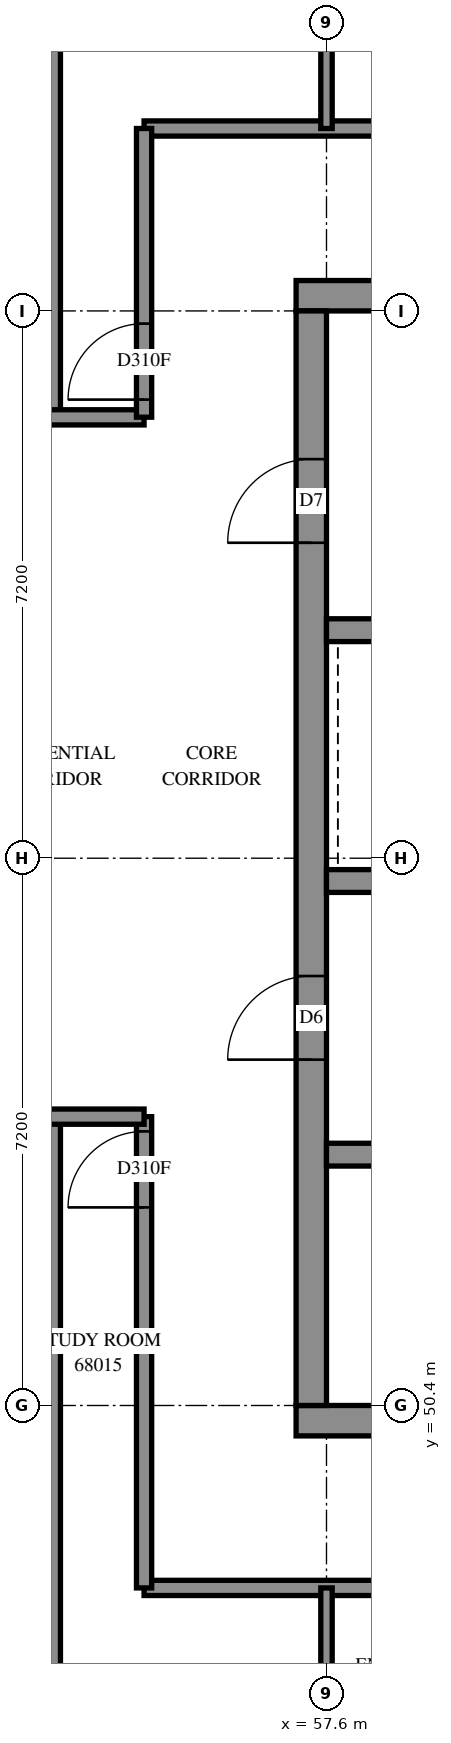
"""IFC4 building model, lengths in metres.
Left out: names, types, materials, properties, quantities, classifications, styles, units other than length and angle.
Written with IfcOpenShell. Run it as: python <this file> out.ifc"""

import sys

from ifc_helpers import new_model, si_unit, direction, frame, frame_2d, origin, place, context, subcontext, project, spatial, rectangle, extrude, element, fill, save


model = new_model("IFC4")
c1 = context("Model", 3, precision=1e-05, world=origin(), true_north=direction((0.0, 1.0)))
c2 = subcontext(c1, "Body", "Model", "MODEL_VIEW")
j1 = project(units=[si_unit("LENGTHUNIT", "METRE"), si_unit("PLANEANGLEUNIT", "RADIAN")], contexts=[c1])
p1 = place(None, origin())
s1 = spatial("IfcSite", under=j1, at=p1, CompositionType="ELEMENT")
p2 = place(p1, origin())
s2 = spatial("IfcBuilding", under=s1, at=p2, CompositionType="ELEMENT")
p3 = place(p2, frame((0.0, 0.0, 250.6)))
s3 = spatial("IfcBuildingStorey", under=s2, at=p3, CompositionType="ELEMENT", Elevation=250.6)
p4 = place(p3, frame((57.2, 50.2, -0.3), z_axis=(0.0, 0.0, 1.0), x_axis=(1.0, 0.0, 0.0)))
e1 = element("IfcWall", 1, at=p4, inside=s3, PredefinedType="SHEAR", context=c2, shape_type="SweptSolid", body=[
    extrude(rectangle(XDim=15.2, YDim=0.4, at=frame_2d((7.6, 0.0))), origin(), (0.0, 0.0, 1.0), 2.7),
])
p5 = place(p3, frame((57.2, 65.0, -0.3), z_axis=(0.0, 0.0, 1.0), x_axis=(1.0, 0.0, 0.0)))
e2 = element("IfcWall", 2, at=p5, inside=s3, PredefinedType="SHEAR", context=c2, shape_type="SweptSolid", body=[
    extrude(rectangle(XDim=15.2, YDim=0.4, at=frame_2d((7.6, 0.0))), origin(), (0.0, 0.0, 1.0), 2.7),
])
p6 = place(p5, frame((10.4, 0.0, 0.3)))
e3 = element("IfcOpeningElement", 3, at=p6, cuts=e2, PredefinedType="OPENING", context=c2, shape_type="SweptSolid", body=[
    extrude(rectangle(XDim=0.8, YDim=2.1, at=frame_2d((0.4, 1.05))), frame((0.0, 0.21, 0.0), z_axis=(0.0, -1.0, 0.0), x_axis=(1.0, 0.0, 0.0)), (0.0, 0.0, 1.0), 0.42),
])
p7 = place(p3, frame((57.4, 50.4, -0.3), z_axis=(0.0, 0.0, 1.0), x_axis=(0.0, 1.0, 0.0)))
e4 = element("IfcWall", 4, at=p7, inside=s3, PredefinedType="SHEAR", context=c2, shape_type="SweptSolid", body=[
    extrude(rectangle(XDim=14.4, YDim=0.4, at=frame_2d((7.2, 0.0))), origin(), (0.0, 0.0, 1.0), 2.7),
])
p8 = place(p7, frame((4.55, 0.0, 0.3)))
e5 = element("IfcOpeningElement", 5, at=p8, cuts=e4, PredefinedType="OPENING", context=c2, shape_type="SweptSolid", body=[
    extrude(rectangle(XDim=1.1, YDim=2.1, at=frame_2d((0.55, 1.05))), frame((0.0, 0.21, 0.0), z_axis=(0.0, -1.0, 0.0), x_axis=(1.0, 0.0, 0.0)), (0.0, 0.0, 1.0), 0.42),
])
p9 = place(p7, frame((11.35, 0.0, 0.3)))
e6 = element("IfcOpeningElement", 6, at=p9, cuts=e4, PredefinedType="OPENING", context=c2, shape_type="SweptSolid", body=[
    extrude(rectangle(XDim=1.1, YDim=2.1, at=frame_2d((0.55, 1.05))), frame((0.0, 0.21, 0.0), z_axis=(0.0, -1.0, 0.0), x_axis=(1.0, 0.0, 0.0)), (0.0, 0.0, 1.0), 0.42),
])
p10 = place(p3, frame((57.6, 53.7, 0.0), z_axis=(0.0, 0.0, 1.0), x_axis=(1.0, 0.0, 0.0)))
e7 = element("IfcWall", 7, at=p10, inside=s3, PredefinedType="SOLIDWALL", context=c2, shape_type="SweptSolid", body=[
    extrude(rectangle(XDim=14.4, YDim=0.3, at=frame_2d((7.2, 0.0))), origin(), (0.0, 0.0, 1.0), 3.1),
])
p11 = place(p10, frame((1.35, 0.0, 0.0)))
e8 = element("IfcOpeningElement", 8, at=p11, cuts=e7, PredefinedType="OPENING", context=c2, shape_type="SweptSolid", body=[
    extrude(rectangle(XDim=0.9, YDim=2.1, at=frame_2d((0.45, 1.05))), frame((0.0, 0.16, 0.0), z_axis=(0.0, -1.0, 0.0), x_axis=(1.0, 0.0, 0.0)), (0.0, 0.0, 1.0), 0.32),
])
p12 = place(p10, frame((4.95, 0.0, 0.0)))
e9 = element("IfcOpeningElement", 9, at=p12, cuts=e7, PredefinedType="OPENING", context=c2, shape_type="SweptSolid", body=[
    extrude(rectangle(XDim=0.9, YDim=2.1, at=frame_2d((0.45, 1.05))), frame((0.0, 0.16, 0.0), z_axis=(0.0, -1.0, 0.0), x_axis=(1.0, 0.0, 0.0)), (0.0, 0.0, 1.0), 0.32),
])
p13 = place(p10, frame((8.55, 0.0, 0.0)))
e10 = element("IfcOpeningElement", 10, at=p13, cuts=e7, PredefinedType="OPENING", context=c2, shape_type="SweptSolid", body=[
    extrude(rectangle(XDim=0.9, YDim=2.1, at=frame_2d((0.45, 1.05))), frame((0.0, 0.16, 0.0), z_axis=(0.0, -1.0, 0.0), x_axis=(1.0, 0.0, 0.0)), (0.0, 0.0, 1.0), 0.32),
])
p14 = place(p10, frame((12.05, 0.0, 0.0)))
e11 = element("IfcOpeningElement", 11, at=p14, cuts=e7, PredefinedType="OPENING", context=c2, shape_type="SweptSolid", body=[
    extrude(rectangle(XDim=1.1, YDim=2.1, at=frame_2d((0.55, 1.05))), frame((0.0, 0.16, 0.0), z_axis=(0.0, -1.0, 0.0), x_axis=(1.0, 0.0, 0.0)), (0.0, 0.0, 1.0), 0.32),
])
p15 = place(p3, frame((57.6, 57.3, 0.0), z_axis=(0.0, 0.0, 1.0), x_axis=(1.0, 0.0, 0.0)))
e12 = element("IfcWall", 12, at=p15, inside=s3, PredefinedType="SOLIDWALL", context=c2, shape_type="SweptSolid", body=[
    extrude(rectangle(XDim=14.4, YDim=0.3, at=frame_2d((7.2, 0.0))), origin(), (0.0, 0.0, 1.0), 3.1),
])
p16 = place(p15, frame((8.55, 0.0, 0.0)))
e13 = element("IfcOpeningElement", 13, at=p16, cuts=e12, PredefinedType="OPENING", context=c2, shape_type="SweptSolid", body=[
    extrude(rectangle(XDim=0.9, YDim=2.1, at=frame_2d((0.45, 1.05))), frame((0.0, 0.16, 0.0), z_axis=(0.0, -1.0, 0.0), x_axis=(1.0, 0.0, 0.0)), (0.0, 0.0, 1.0), 0.32),
])
p17 = place(p15, frame((1.25, 0.0, 0.0)))
e14 = element("IfcOpeningElement", 14, at=p17, cuts=e12, PredefinedType="OPENING", context=c2, shape_type="SweptSolid", body=[
    extrude(rectangle(XDim=1.1, YDim=2.1, at=frame_2d((0.55, 1.05))), frame((0.0, 0.16, 0.0), z_axis=(0.0, -1.0, 0.0), x_axis=(1.0, 0.0, 0.0)), (0.0, 0.0, 1.0), 0.32),
])
p18 = place(p15, frame((4.85, 0.0, 0.0)))
e15 = element("IfcOpeningElement", 15, at=p18, cuts=e12, PredefinedType="OPENING", context=c2, shape_type="SweptSolid", body=[
    extrude(rectangle(XDim=1.1, YDim=2.1, at=frame_2d((0.55, 1.05))), frame((0.0, 0.16, 0.0), z_axis=(0.0, -1.0, 0.0), x_axis=(1.0, 0.0, 0.0)), (0.0, 0.0, 1.0), 0.32),
])
p19 = place(p15, frame((12.05, 0.0, 0.0)))
e16 = element("IfcOpeningElement", 16, at=p19, cuts=e12, PredefinedType="OPENING", context=c2, shape_type="SweptSolid", body=[
    extrude(rectangle(XDim=1.1, YDim=2.1, at=frame_2d((0.55, 1.05))), frame((0.0, 0.16, 0.0), z_axis=(0.0, -1.0, 0.0), x_axis=(1.0, 0.0, 0.0)), (0.0, 0.0, 1.0), 0.32),
])
p20 = place(p3, frame((57.6, 60.6, 0.0), z_axis=(0.0, 0.0, 1.0), x_axis=(1.0, 0.0, 0.0)))
e17 = element("IfcWall", 17, at=p20, inside=s3, PredefinedType="SOLIDWALL", context=c2, shape_type="SweptSolid", body=[
    extrude(rectangle(XDim=7.2, YDim=0.3, at=frame_2d((3.6, 0.0))), origin(), (0.0, 0.0, 1.0), 3.1),
])
p21 = place(p3, frame((55.2, 67.2, 0.0), z_axis=(0.0, 0.0, 1.0), x_axis=(1.0, 0.0, 0.0)))
e18 = element("IfcWall", 18, at=p21, inside=s3, PredefinedType="PARTITIONING", context=c2, shape_type="SweptSolid", body=[
    extrude(rectangle(XDim=19.2, YDim=0.2, at=frame_2d((9.6, 0.0))), origin(), (0.0, 0.0, 1.0), 3.1),
])
p22 = place(p21, frame((6.299, 0.0, 0.0)))
e19 = element("IfcOpeningElement", 19, at=p22, cuts=e18, PredefinedType="OPENING", context=c2, shape_type="SweptSolid", body=[
    extrude(rectangle(XDim=0.9, YDim=2.1, at=frame_2d((0.45, 1.05))), frame((0.0, 0.11, 0.0), z_axis=(0.0, -1.0, 0.0), x_axis=(1.0, 0.0, 0.0)), (0.0, 0.0, 1.0), 0.22),
])
p23 = place(p21, frame((13.65, 0.0, 0.0)))
e20 = element("IfcOpeningElement", 20, at=p23, cuts=e18, PredefinedType="OPENING", context=c2, shape_type="SweptSolid", body=[
    extrude(rectangle(XDim=0.9, YDim=2.1, at=frame_2d((0.45, 1.05))), frame((0.0, 0.11, 0.0), z_axis=(0.0, -1.0, 0.0), x_axis=(1.0, 0.0, 0.0)), (0.0, 0.0, 1.0), 0.22),
])
p24 = place(p3, frame((55.2, 48.0, 0.0), z_axis=(0.0, 0.0, 1.0), x_axis=(1.0, 0.0, 0.0)))
e21 = element("IfcWall", 21, at=p24, inside=s3, PredefinedType="PARTITIONING", context=c2, shape_type="SweptSolid", body=[
    extrude(rectangle(XDim=19.15, YDim=0.2, at=frame_2d((9.575, 0.0))), origin(), (0.0, 0.0, 1.0), 3.1),
])
p25 = place(p24, frame((6.299, 0.0, 0.0)))
e22 = element("IfcOpeningElement", 22, at=p25, cuts=e21, PredefinedType="OPENING", context=c2, shape_type="SweptSolid", body=[
    extrude(rectangle(XDim=0.9, YDim=2.1, at=frame_2d((0.45, 1.05))), frame((0.0, 0.11, 0.0), z_axis=(0.0, -1.0, 0.0), x_axis=(1.0, 0.0, 0.0)), (0.0, 0.0, 1.0), 0.22),
])
p26 = place(p24, frame((13.499, 0.0, 0.0)))
e23 = element("IfcOpeningElement", 23, at=p26, cuts=e21, PredefinedType="OPENING", context=c2, shape_type="SweptSolid", body=[
    extrude(rectangle(XDim=0.9, YDim=2.1, at=frame_2d((0.45, 1.05))), frame((0.0, 0.11, 0.0), z_axis=(0.0, -1.0, 0.0), x_axis=(1.0, 0.0, 0.0)), (0.0, 0.0, 1.0), 0.22),
])
p27 = place(p3, frame((54.0, 42.331, 0.0), z_axis=(0.0, 0.0, 1.0), x_axis=(0.0, 1.0, 0.0)))
e24 = element("IfcWall", 24, at=p27, inside=s3, PredefinedType="PARTITIONING", context=c2, shape_type="SweptSolid", body=[
    extrude(rectangle(XDim=11.87, YDim=0.2, at=frame_2d((5.935, 0.0))), origin(), (0.0, 0.0, 1.0), 3.1),
])
p28 = place(p3, frame((54.0, 63.4, 0.0), z_axis=(0.0, 0.0, 1.0), x_axis=(0.0, 1.0, 0.0)))
e25 = element("IfcWall", 25, at=p28, inside=s3, PredefinedType="PARTITIONING", context=c2, shape_type="SweptSolid", body=[
    extrude(rectangle(XDim=9.408, YDim=0.2, at=frame_2d((4.704, 0.0))), origin(), (0.0, 0.0, 1.0), 3.1),
])
p29 = place(p3, frame((55.2, 48.0, 0.0), z_axis=(0.0, 0.0, 1.0), x_axis=(0.0, 1.0, 0.0)))
e26 = element("IfcWall", 26, at=p29, inside=s3, PredefinedType="PARTITIONING", context=c2, shape_type="SweptSolid", body=[
    extrude(rectangle(XDim=6.2, YDim=0.2, at=frame_2d((3.1, 0.0))), origin(), (0.0, 0.0, 1.0), 3.1),
])
p30 = place(p29, frame((5.006, 0.0, 0.0)))
e27 = element("IfcOpeningElement", 27, at=p30, cuts=e26, PredefinedType="OPENING", context=c2, shape_type="SweptSolid", body=[
    extrude(rectangle(XDim=1.0, YDim=2.1, at=frame_2d((0.5, 1.05))), frame((0.0, 0.11, 0.0), z_axis=(0.0, -1.0, 0.0), x_axis=(1.0, 0.0, 0.0)), (0.0, 0.0, 1.0), 0.22),
])
p31 = place(p3, frame((50.85, 54.2, 0.0), z_axis=(0.0, 0.0, 1.0), x_axis=(1.0, 0.0, 0.0)))
e28 = element("IfcWall", 28, at=p31, inside=s3, PredefinedType="PARTITIONING", context=c2, shape_type="SweptSolid", body=[
    extrude(rectangle(XDim=4.35, YDim=0.2, at=frame_2d((2.175, 0.0))), origin(), (0.0, 0.0, 1.0), 3.1),
])
p32 = place(p31, frame((1.931, 0.0, 0.0)))
e29 = element("IfcOpeningElement", 29, at=p32, cuts=e28, PredefinedType="OPENING", context=c2, shape_type="SweptSolid", body=[
    extrude(rectangle(XDim=1.0, YDim=2.1, at=frame_2d((0.5, 1.05))), frame((0.0, 0.11, 0.0), z_axis=(0.0, -1.0, 0.0), x_axis=(1.0, 0.0, 0.0)), (0.0, 0.0, 1.0), 0.22),
])
p33 = place(p3, frame((50.85, 63.4, 0.0), z_axis=(0.0, 0.0, 1.0), x_axis=(1.0, 0.0, 0.0)))
e30 = element("IfcWall", 30, at=p33, inside=s3, PredefinedType="PARTITIONING", context=c2, shape_type="SweptSolid", body=[
    extrude(rectangle(XDim=4.35, YDim=0.2, at=frame_2d((2.175, 0.0))), origin(), (0.0, 0.0, 1.0), 3.1),
])
p34 = place(p33, frame((1.946, 0.0, 0.0)))
e31 = element("IfcOpeningElement", 31, at=p34, cuts=e30, PredefinedType="OPENING", context=c2, shape_type="SweptSolid", body=[
    extrude(rectangle(XDim=1.0, YDim=2.1, at=frame_2d((0.5, 1.05))), frame((0.0, 0.11, 0.0), z_axis=(0.0, -1.0, 0.0), x_axis=(1.0, 0.0, 0.0)), (0.0, 0.0, 1.0), 0.22),
])
p35 = place(p3, frame((55.2, 63.402, 0.0), z_axis=(0.0, 0.0, 1.0), x_axis=(0.0, 1.0, 0.0)))
e32 = element("IfcWall", 32, at=p35, inside=s3, PredefinedType="PARTITIONING", context=c2, shape_type="SweptSolid", body=[
    extrude(rectangle(XDim=3.798, YDim=0.2, at=frame_2d((1.899, 0.0))), origin(), (0.0, 0.0, 1.0), 3.1),
])
p36 = place(p35, frame((0.231, 0.0, 0.0)))
e33 = element("IfcOpeningElement", 33, at=p36, cuts=e32, PredefinedType="OPENING", context=c2, shape_type="SweptSolid", body=[
    extrude(rectangle(XDim=1.0, YDim=2.1, at=frame_2d((0.5, 1.05))), frame((0.0, 0.11, 0.0), z_axis=(0.0, -1.0, 0.0), x_axis=(1.0, 0.0, 0.0)), (0.0, 0.0, 1.0), 0.22),
])
for number, where, z_axis, x_axis in (
    (34, (57.6, 45.6, 0.0), (0.0, 0.0, 1.0), (0.0, 1.0, 0.0)),
    (35, (57.6, 67.2, 0.0), (0.0, 0.0, 1.0), (0.0, 1.0, 0.0)),
):
    element("IfcWall", number, at=place(p3, frame(where, z_axis=z_axis, x_axis=x_axis)), inside=s3, PredefinedType="PARTITIONING", context=c2, shape_type="SweptSolid", body=[
        extrude(rectangle(XDim=2.4, YDim=0.15, at=frame_2d((1.2, 0.0))), origin(), (0.0, 0.0, 1.0), 3.1),
    ])
p37 = place(p8, origin())
e36 = element("IfcDoor", 36, at=p37, inside=s3, OperationType="DOUBLE_DOOR_SINGLE_SWING", PredefinedType="DOOR", context=c2, shape_type="SweptSolid", body=[
    extrude(rectangle(XDim=1.1, YDim=2.1, at=frame_2d((0.55, 1.05))), frame((0.0, 0.025, 0.0), z_axis=(0.0, -1.0, 0.0), x_axis=(1.0, 0.0, 0.0)), (0.0, 0.0, 1.0), 0.05),
])
fill(e5, e36)
p38 = place(p9, origin())
e37 = element("IfcDoor", 37, at=p38, inside=s3, OperationType="SINGLE_SWING_LEFT", PredefinedType="DOOR", context=c2, shape_type="SweptSolid", body=[
    extrude(rectangle(XDim=1.1, YDim=2.1, at=frame_2d((0.55, 1.05))), frame((0.0, 0.025, 0.0), z_axis=(0.0, -1.0, 0.0), x_axis=(1.0, 0.0, 0.0)), (0.0, 0.0, 1.0), 0.05),
])
fill(e6, e37)
p39 = place(p30, origin())
e38 = element("IfcDoor", 38, at=p39, inside=s3, OperationType="SINGLE_SWING_RIGHT", PredefinedType="DOOR", context=c2, shape_type="SweptSolid", body=[
    extrude(rectangle(XDim=1.0, YDim=2.1, at=frame_2d((0.5, 1.05))), frame((0.0, 0.025, 0.0), z_axis=(0.0, -1.0, 0.0), x_axis=(1.0, 0.0, 0.0)), (0.0, 0.0, 1.0), 0.05),
])
fill(e27, e38)
p40 = place(p36, origin())
e39 = element("IfcDoor", 39, at=p40, inside=s3, OperationType="SINGLE_SWING_LEFT", PredefinedType="DOOR", context=c2, shape_type="SweptSolid", body=[
    extrude(rectangle(XDim=1.0, YDim=2.1, at=frame_2d((0.5, 1.05))), frame((0.0, 0.025, 0.0), z_axis=(0.0, -1.0, 0.0), x_axis=(1.0, 0.0, 0.0)), (0.0, 0.0, 1.0), 0.05),
])
fill(e33, e39)
save(model, sys.argv[1])
